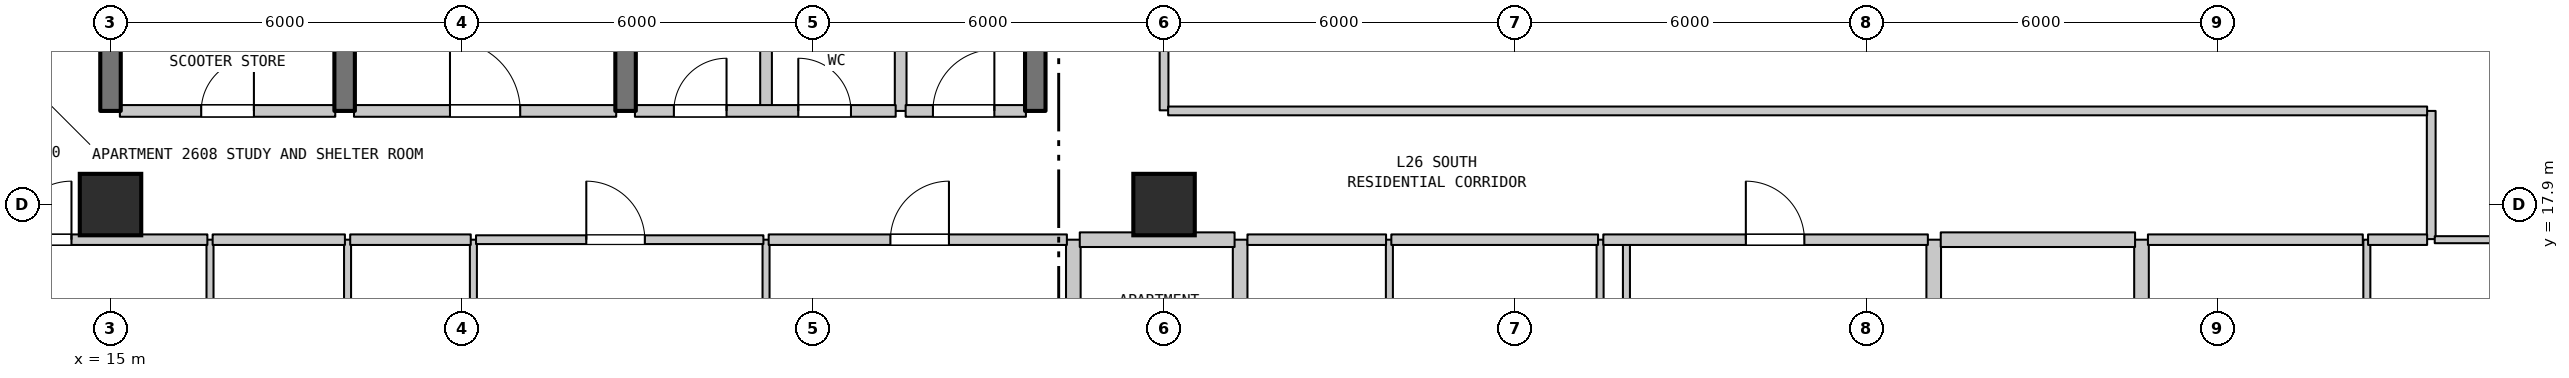
"""IFC4 building model, lengths in metres.
Left out: names, types, materials, properties, quantities, classifications, styles, units other than length and angle.
Written with IfcOpenShell. Run it as: python <this file> out.ifc"""

import sys

from ifc_helpers import new_model, si_unit, direction, frame, frame_2d, origin, origin_2d, place, context, subcontext, project, spatial, rectangle, extrude, element, fill, save


model = new_model("IFC4")
c1 = context("Model", 3, precision=1e-05, world=origin(), true_north=direction((0.0, 1.0)))
c2 = subcontext(c1, "Body", "Model", "MODEL_VIEW")
j1 = project(units=[si_unit("LENGTHUNIT", "METRE"), si_unit("PLANEANGLEUNIT", "RADIAN")], contexts=[c1])
p1 = place(None, origin())
s1 = spatial("IfcSite", under=j1, at=p1, CompositionType="ELEMENT")
p2 = place(p1, origin())
s2 = spatial("IfcBuilding", under=s1, at=p2, CompositionType="ELEMENT")
p3 = place(p2, frame((0.0, 0.0, 109.4)))
s3 = spatial("IfcBuildingStorey", under=s2, at=p3, CompositionType="ELEMENT", Elevation=109.4)
for number, where, z_axis, x_axis in (
    (1, (15.0, 17.9, 0.0), (0.0, 0.0, 1.0), (1.0, 0.0, 0.0)),
    (2, (33.0, 17.9, 0.0), (0.0, 0.0, 1.0), (1.0, 0.0, 0.0)),
):
    element("IfcColumn", number, at=place(p3, frame(where, z_axis=z_axis, x_axis=x_axis)), inside=s3, PredefinedType="COLUMN", context=c2, shape_type="SweptSolid", body=[
        extrude(rectangle(XDim=1.05, YDim=1.05, at=origin_2d()), origin(), (0.0, 0.0, 1.0), 3.7),
    ])
p4 = place(p3, frame((15.0, 19.5, 0.0), z_axis=(0.0, 0.0, 1.0), x_axis=(0.0, 1.0, 0.0)))
e3 = element("IfcWall", 3, at=p4, inside=s3, PredefinedType="SHEAR", context=c2, shape_type="SweptSolid", body=[
    extrude(rectangle(XDim=3.2, YDim=0.35, at=frame_2d((1.6, 0.0))), origin(), (0.0, 0.0, 1.0), 3.385),
])
p5 = place(p3, frame((16.7, 14.1, 0.0), z_axis=(0.0, 0.0, 1.0), x_axis=(0.0, 1.0, 0.0)))
e4 = element("IfcWall", 4, at=p5, inside=s3, PredefinedType="PARTITIONING", context=c2, shape_type="SweptSolid", body=[
    extrude(rectangle(XDim=3.2, YDim=0.12, at=frame_2d((1.6, 0.0))), origin(), (0.0, 0.0, 1.0), 3.385),
])
p6 = place(p5, frame((1.15, 0.0, 0.0)))
e5 = element("IfcOpeningElement", 5, at=p6, cuts=e4, PredefinedType="OPENING", context=c2, shape_type="SweptSolid", body=[
    extrude(rectangle(XDim=0.9, YDim=2.15, at=frame_2d((0.45, 1.075))), frame((0.0, 0.07, 0.0), z_axis=(0.0, -1.0, 0.0), x_axis=(1.0, 0.0, 0.0)), (0.0, 0.0, 1.0), 0.14),
])
p7 = place(p3, frame((19.0, 19.5, 0.0), z_axis=(0.0, 0.0, 1.0), x_axis=(0.0, 1.0, 0.0)))
e6 = element("IfcWall", 6, at=p7, inside=s3, PredefinedType="SHEAR", context=c2, shape_type="SweptSolid", body=[
    extrude(rectangle(XDim=3.2, YDim=0.35, at=frame_2d((1.6, 0.0))), origin(), (0.0, 0.0, 1.0), 3.385),
])
p8 = place(p3, frame((19.05, 14.1, 0.0), z_axis=(0.0, 0.0, 1.0), x_axis=(0.0, 1.0, 0.0)))
e7 = element("IfcWall", 7, at=p8, inside=s3, PredefinedType="PARTITIONING", context=c2, shape_type="SweptSolid", body=[
    extrude(rectangle(XDim=3.2, YDim=0.12, at=frame_2d((1.6, 0.0))), origin(), (0.0, 0.0, 1.0), 3.385),
])
p9 = place(p3, frame((21.2, 2.227, 0.0), z_axis=(0.0, 0.0, 1.0), x_axis=(0.0, 1.0, 0.0)))
e8 = element("IfcWall", 8, at=p9, inside=s3, PredefinedType="PARTITIONING", context=c2, shape_type="SweptSolid", body=[
    extrude(rectangle(XDim=15.073, YDim=0.12, at=frame_2d((7.537, 0.0))), origin(), (0.0, 0.0, 1.0), 3.385),
])
p10 = place(p3, frame((23.8, 19.5, 0.0), z_axis=(0.0, 0.0, 1.0), x_axis=(0.0, 1.0, 0.0)))
e9 = element("IfcWall", 9, at=p10, inside=s3, PredefinedType="SHEAR", context=c2, shape_type="SweptSolid", body=[
    extrude(rectangle(XDim=3.2, YDim=0.35, at=frame_2d((1.6, 0.0))), origin(), (0.0, 0.0, 1.0), 3.385),
])
p11 = place(p3, frame((26.2, 14.85, 0.0), z_axis=(0.0, 0.0, 1.0), x_axis=(0.0, 1.0, 0.0)))
e10 = element("IfcWall", 10, at=p11, inside=s3, PredefinedType="PARTITIONING", context=c2, shape_type="SweptSolid", body=[
    extrude(rectangle(XDim=2.45, YDim=0.12, at=frame_2d((1.225, 0.0))), origin(), (0.0, 0.0, 1.0), 3.385),
])
for number, where, z_axis, x_axis in (
    (11, (26.2, 19.5, 0.0), (0.0, 0.0, 1.0), (0.0, 1.0, 0.0)),
    (12, (28.5, 19.5, 0.0), (0.0, 0.0, 1.0), (0.0, 1.0, 0.0)),
):
    element("IfcWall", number, at=place(p3, frame(where, z_axis=z_axis, x_axis=x_axis)), inside=s3, PredefinedType="STANDARD", context=c2, shape_type="SweptSolid", body=[
        extrude(rectangle(XDim=3.2, YDim=0.2, at=frame_2d((1.6, 0.0))), origin(), (0.0, 0.0, 1.0), 3.385),
    ])
p12 = place(p3, frame((30.8, 19.5, 0.0), z_axis=(0.0, 0.0, 1.0), x_axis=(0.0, 1.0, 0.0)))
e13 = element("IfcWall", 13, at=p12, inside=s3, PredefinedType="SHEAR", context=c2, shape_type="SweptSolid", body=[
    extrude(rectangle(XDim=3.2, YDim=0.35, at=frame_2d((1.6, 0.0))), origin(), (0.0, 0.0, 1.0), 3.385),
])
p13 = place(p3, frame((31.45, 11.15, 0.0), z_axis=(0.0, 0.0, 1.0), x_axis=(0.0, 1.0, 0.0)))
e14 = element("IfcWall", 14, at=p13, inside=s3, PredefinedType="STANDARD", context=c2, shape_type="SweptSolid", body=[
    extrude(rectangle(XDim=6.15, YDim=0.25, at=frame_2d((3.075, 0.0))), origin(), (0.0, 0.0, 1.0), 3.385),
])
p14 = place(p13, frame((2.529, 0.0, 0.0)))
e15 = element("IfcOpeningElement", 15, at=p14, cuts=e14, PredefinedType="OPENING", context=c2, shape_type="SweptSolid", body=[
    extrude(rectangle(XDim=0.95, YDim=2.15, at=frame_2d((0.475, 1.075))), frame((0.0, 0.135, 0.0), z_axis=(0.0, -1.0, 0.0), x_axis=(1.0, 0.0, 0.0)), (0.0, 0.0, 1.0), 0.27),
])
p15 = place(p3, frame((33.0, 19.51, 0.0), z_axis=(0.0, 0.0, 1.0), x_axis=(0.0, 1.0, 0.0)))
e16 = element("IfcWall", 16, at=p15, inside=s3, PredefinedType="STANDARD", context=c2, shape_type="SweptSolid", body=[
    extrude(rectangle(XDim=6.18, YDim=0.15, at=frame_2d((3.09, 0.0))), origin(), (0.0, 0.0, 1.0), 2.935),
])
p16 = place(p3, frame((34.3, 11.15, 0.0), z_axis=(0.0, 0.0, 1.0), x_axis=(0.0, 1.0, 0.0)))
e17 = element("IfcWall", 17, at=p16, inside=s3, PredefinedType="STANDARD", context=c2, shape_type="SweptSolid", body=[
    extrude(rectangle(XDim=6.15, YDim=0.25, at=frame_2d((3.075, 0.0))), origin(), (0.0, 0.0, 1.0), 3.385),
])
for number, where, z_axis, x_axis in (
    (18, (36.85, 11.15, 0.0), (0.0, 0.0, 1.0), (0.0, 1.0, 0.0)),
    (19, (40.45, 11.15, 0.0), (0.0, 0.0, 1.0), (0.0, 1.0, 0.0)),
):
    element("IfcWall", number, at=place(p3, frame(where, z_axis=z_axis, x_axis=x_axis)), inside=s3, PredefinedType="PARTITIONING", context=c2, shape_type="SweptSolid", body=[
        extrude(rectangle(XDim=6.15, YDim=0.12, at=frame_2d((3.075, 0.0))), origin(), (0.0, 0.0, 1.0), 3.385),
    ])
p17 = place(p3, frame((40.9, 14.85, 0.0), z_axis=(0.0, 0.0, 1.0), x_axis=(0.0, 1.0, 0.0)))
e20 = element("IfcWall", 20, at=p17, inside=s3, PredefinedType="PARTITIONING", context=c2, shape_type="SweptSolid", body=[
    extrude(rectangle(XDim=2.45, YDim=0.12, at=frame_2d((1.225, 0.0))), origin(), (0.0, 0.0, 1.0), 3.385),
])
for number, where, z_axis, x_axis in (
    (21, (46.15, 11.15, 0.0), (0.0, 0.0, 1.0), (0.0, 1.0, 0.0)),
    (22, (49.7, 11.15, 0.0), (0.0, 0.0, 1.0), (0.0, 1.0, 0.0)),
):
    element("IfcWall", number, at=place(p3, frame(where, z_axis=z_axis, x_axis=x_axis)), inside=s3, PredefinedType="STANDARD", context=c2, shape_type="SweptSolid", body=[
        extrude(rectangle(XDim=6.15, YDim=0.25, at=frame_2d((3.075, 0.0))), origin(), (0.0, 0.0, 1.0), 3.385),
    ])
p18 = place(p3, frame((53.55, 11.15, 0.0), z_axis=(0.0, 0.0, 1.0), x_axis=(0.0, 1.0, 0.0)))
e23 = element("IfcWall", 23, at=p18, inside=s3, PredefinedType="PARTITIONING", context=c2, shape_type="SweptSolid", body=[
    extrude(rectangle(XDim=6.15, YDim=0.12, at=frame_2d((3.075, 0.0))), origin(), (0.0, 0.0, 1.0), 3.385),
])
p19 = place(p3, frame((54.65, 17.31, 0.0), z_axis=(0.0, 0.0, 1.0), x_axis=(0.0, 1.0, 0.0)))
e24 = element("IfcWall", 24, at=p19, inside=s3, PredefinedType="STANDARD", context=c2, shape_type="SweptSolid", body=[
    extrude(rectangle(XDim=2.19, YDim=0.15, at=frame_2d((1.095, 0.0))), origin(), (0.0, 0.0, 1.0), 3.385),
])
p20 = place(p3, frame((12.875, 17.3, 0.0), z_axis=(0.0, 0.0, 1.0), x_axis=(1.0, 0.0, 0.0)))
e25 = element("IfcWall", 25, at=p20, inside=s3, PredefinedType="STANDARD", context=c2, shape_type="SweptSolid", body=[
    extrude(rectangle(XDim=3.78, YDim=0.18, at=frame_2d((1.89, 0.0))), origin(), (0.0, 0.0, 1.0), 3.385),
])
p21 = place(p20, frame((0.458, 0.0, 0.0)))
e26 = element("IfcOpeningElement", 26, at=p21, cuts=e25, PredefinedType="OPENING", context=c2, shape_type="SweptSolid", body=[
    extrude(rectangle(XDim=1.0, YDim=2.15, at=frame_2d((0.5, 1.075))), frame((0.0, 0.1, 0.0), z_axis=(0.0, -1.0, 0.0), x_axis=(1.0, 0.0, 0.0)), (0.0, 0.0, 1.0), 0.2),
])
p22 = place(p3, frame((16.745, 17.3, 0.0), z_axis=(0.0, 0.0, 1.0), x_axis=(1.0, 0.0, 0.0)))
e27 = element("IfcWall", 27, at=p22, inside=s3, PredefinedType="STANDARD", context=c2, shape_type="SweptSolid", body=[
    extrude(rectangle(XDim=2.26, YDim=0.18, at=frame_2d((1.13, 0.0))), origin(), (0.0, 0.0, 1.0), 3.385),
])
p23 = place(p3, frame((19.095, 17.3, 0.0), z_axis=(0.0, 0.0, 1.0), x_axis=(1.0, 0.0, 0.0)))
e28 = element("IfcWall", 28, at=p23, inside=s3, PredefinedType="STANDARD", context=c2, shape_type="SweptSolid", body=[
    extrude(rectangle(XDim=2.06, YDim=0.18, at=frame_2d((1.03, 0.0))), origin(), (0.0, 0.0, 1.0), 3.385),
])
p24 = place(p3, frame((21.245, 17.3, 0.0), z_axis=(0.0, 0.0, 1.0), x_axis=(1.0, 0.0, 0.0)))
e29 = element("IfcWall", 29, at=p24, inside=s3, PredefinedType="STANDARD", context=c2, shape_type="SweptSolid", body=[
    extrude(rectangle(XDim=4.91, YDim=0.15, at=frame_2d((2.455, 0.0))), origin(), (0.0, 0.0, 1.0), 3.385),
])
p25 = place(p24, frame((1.884, 0.0, 0.0)))
e30 = element("IfcOpeningElement", 30, at=p25, cuts=e29, PredefinedType="OPENING", context=c2, shape_type="SweptSolid", body=[
    extrude(rectangle(XDim=1.0, YDim=2.15, at=frame_2d((0.5, 1.075))), frame((0.0, 0.085, 0.0), z_axis=(0.0, -1.0, 0.0), x_axis=(1.0, 0.0, 0.0)), (0.0, 0.0, 1.0), 0.17),
])
p26 = place(p3, frame((26.245, 17.3, 0.0), z_axis=(0.0, 0.0, 1.0), x_axis=(1.0, 0.0, 0.0)))
e31 = element("IfcWall", 31, at=p26, inside=s3, PredefinedType="STANDARD", context=c2, shape_type="SweptSolid", body=[
    extrude(rectangle(XDim=5.095, YDim=0.18, at=frame_2d((2.547, 0.0))), origin(), (0.0, 0.0, 1.0), 3.385),
])
p27 = place(p26, frame((2.08, 0.0, 0.0)))
e32 = element("IfcOpeningElement", 32, at=p27, cuts=e31, PredefinedType="OPENING", context=c2, shape_type="SweptSolid", body=[
    extrude(rectangle(XDim=1.0, YDim=2.15, at=frame_2d((0.5, 1.075))), frame((0.0, 0.1, 0.0), z_axis=(0.0, -1.0, 0.0), x_axis=(1.0, 0.0, 0.0)), (0.0, 0.0, 1.0), 0.2),
])
p28 = place(p3, frame((31.56, 17.3, 0.0), z_axis=(0.0, 0.0, 1.0), x_axis=(1.0, 0.0, 0.0)))
e33 = element("IfcWall", 33, at=p28, inside=s3, PredefinedType="STANDARD", context=c2, shape_type="SweptSolid", body=[
    extrude(rectangle(XDim=2.645, YDim=0.25, at=frame_2d((1.323, 0.0))), origin(), (0.0, 0.0, 1.0), 3.385),
])
p29 = place(p3, frame((34.425, 17.3, 0.0), z_axis=(0.0, 0.0, 1.0), x_axis=(1.0, 0.0, 0.0)))
e34 = element("IfcWall", 34, at=p29, inside=s3, PredefinedType="STANDARD", context=c2, shape_type="SweptSolid", body=[
    extrude(rectangle(XDim=2.368, YDim=0.18, at=frame_2d((1.184, 0.0))), origin(), (0.0, 0.0, 1.0), 3.385),
])
p30 = place(p3, frame((36.883, 17.3, 0.0), z_axis=(0.0, 0.0, 1.0), x_axis=(1.0, 0.0, 0.0)))
e35 = element("IfcWall", 35, at=p30, inside=s3, PredefinedType="STANDARD", context=c2, shape_type="SweptSolid", body=[
    extrude(rectangle(XDim=3.532, YDim=0.18, at=frame_2d((1.766, 0.0))), origin(), (0.0, 0.0, 1.0), 3.385),
])
p31 = place(p3, frame((40.505, 17.3, 0.0), z_axis=(0.0, 0.0, 1.0), x_axis=(1.0, 0.0, 0.0)))
e36 = element("IfcWall", 36, at=p31, inside=s3, PredefinedType="STANDARD", context=c2, shape_type="SweptSolid", body=[
    extrude(rectangle(XDim=5.545, YDim=0.18, at=frame_2d((2.772, 0.0))), origin(), (0.0, 0.0, 1.0), 3.385),
])
p32 = place(p31, frame((2.435, 0.0, 0.0)))
e37 = element("IfcOpeningElement", 37, at=p32, cuts=e36, PredefinedType="OPENING", context=c2, shape_type="SweptSolid", body=[
    extrude(rectangle(XDim=1.0, YDim=2.15, at=frame_2d((0.5, 1.075))), frame((0.0, 0.1, 0.0), z_axis=(0.0, -1.0, 0.0), x_axis=(1.0, 0.0, 0.0)), (0.0, 0.0, 1.0), 0.2),
])
p33 = place(p3, frame((46.27, 17.3, 0.0), z_axis=(0.0, 0.0, 1.0), x_axis=(1.0, 0.0, 0.0)))
e38 = element("IfcWall", 38, at=p33, inside=s3, PredefinedType="STANDARD", context=c2, shape_type="SweptSolid", body=[
    extrude(rectangle(XDim=3.32, YDim=0.25, at=frame_2d((1.66, 0.0))), origin(), (0.0, 0.0, 1.0), 3.385),
])
p34 = place(p3, frame((49.81, 17.3, 0.0), z_axis=(0.0, 0.0, 1.0), x_axis=(1.0, 0.0, 0.0)))
e39 = element("IfcWall", 39, at=p34, inside=s3, PredefinedType="STANDARD", context=c2, shape_type="SweptSolid", body=[
    extrude(rectangle(XDim=3.671, YDim=0.18, at=frame_2d((1.835, 0.0))), origin(), (0.0, 0.0, 1.0), 3.385),
])
p35 = place(p3, frame((53.571, 17.3, 0.0), z_axis=(0.0, 0.0, 1.0), x_axis=(1.0, 0.0, 0.0)))
e40 = element("IfcWall", 40, at=p35, inside=s3, PredefinedType="STANDARD", context=c2, shape_type="SweptSolid", body=[
    extrude(rectangle(XDim=1.009, YDim=0.18, at=frame_2d((0.504, 0.0))), origin(), (0.0, 0.0, 1.0), 3.385),
])
p36 = place(p3, frame((54.71, 17.3, 0.0), z_axis=(0.0, 0.0, 1.0), x_axis=(1.0, 0.0, 0.0)))
e41 = element("IfcWall", 41, at=p36, inside=s3, PredefinedType="PARTITIONING", context=c2, shape_type="SweptSolid", body=[
    extrude(rectangle(XDim=1.635, YDim=0.12, at=frame_2d((0.817, 0.0))), origin(), (0.0, 0.0, 1.0), 3.385),
])
p37 = place(p3, frame((15.16, 19.5, 0.0), z_axis=(0.0, 0.0, 1.0), x_axis=(1.0, 0.0, 0.0)))
e42 = element("IfcWall", 42, at=p37, inside=s3, PredefinedType="STANDARD", context=c2, shape_type="SweptSolid", body=[
    extrude(rectangle(XDim=3.68, YDim=0.2, at=frame_2d((1.84, 0.0))), origin(), (0.0, 0.0, 1.0), 3.385),
])
p38 = place(p37, frame((1.39, 0.0, 0.0)))
e43 = element("IfcOpeningElement", 43, at=p38, cuts=e42, PredefinedType="OPENING", context=c2, shape_type="SweptSolid", body=[
    extrude(rectangle(XDim=0.9, YDim=2.15, at=frame_2d((0.45, 1.075))), frame((0.0, 0.11, 0.0), z_axis=(0.0, -1.0, 0.0), x_axis=(1.0, 0.0, 0.0)), (0.0, 0.0, 1.0), 0.22),
])
p39 = place(p3, frame((19.16, 19.5, 0.0), z_axis=(0.0, 0.0, 1.0), x_axis=(1.0, 0.0, 0.0)))
e44 = element("IfcWall", 44, at=p39, inside=s3, PredefinedType="STANDARD", context=c2, shape_type="SweptSolid", body=[
    extrude(rectangle(XDim=4.48, YDim=0.2, at=frame_2d((2.24, 0.0))), origin(), (0.0, 0.0, 1.0), 3.385),
])
p40 = place(p39, frame((1.64, 0.0, 0.0)))
e45 = element("IfcOpeningElement", 45, at=p40, cuts=e44, PredefinedType="OPENING", context=c2, shape_type="SweptSolid", body=[
    extrude(rectangle(XDim=1.2, YDim=2.2, at=frame_2d((0.6, 1.1))), frame((0.0, 0.11, 0.0), z_axis=(0.0, -1.0, 0.0), x_axis=(1.0, 0.0, 0.0)), (0.0, 0.0, 1.0), 0.22),
])
p41 = place(p3, frame((23.96, 19.5, 0.0), z_axis=(0.0, 0.0, 1.0), x_axis=(1.0, 0.0, 0.0)))
e46 = element("IfcWall", 46, at=p41, inside=s3, PredefinedType="STANDARD", context=c2, shape_type="SweptSolid", body=[
    extrude(rectangle(XDim=4.455, YDim=0.2, at=frame_2d((2.228, 0.0))), origin(), (0.0, 0.0, 1.0), 3.385),
])
p42 = place(p41, frame((0.665, 0.0, 0.0)))
e47 = element("IfcOpeningElement", 47, at=p42, cuts=e46, PredefinedType="OPENING", context=c2, shape_type="SweptSolid", body=[
    extrude(rectangle(XDim=0.9, YDim=2.15, at=frame_2d((0.45, 1.075))), frame((0.0, 0.11, 0.0), z_axis=(0.0, -1.0, 0.0), x_axis=(1.0, 0.0, 0.0)), (0.0, 0.0, 1.0), 0.22),
])
p43 = place(p41, frame((2.791, 0.0, 0.0)))
e48 = element("IfcOpeningElement", 48, at=p43, cuts=e46, PredefinedType="OPENING", context=c2, shape_type="SweptSolid", body=[
    extrude(rectangle(XDim=0.9, YDim=2.15, at=frame_2d((0.45, 1.075))), frame((0.0, 0.11, 0.0), z_axis=(0.0, -1.0, 0.0), x_axis=(1.0, 0.0, 0.0)), (0.0, 0.0, 1.0), 0.22),
])
p44 = place(p3, frame((28.585, 19.5, 0.0), z_axis=(0.0, 0.0, 1.0), x_axis=(1.0, 0.0, 0.0)))
e49 = element("IfcWall", 49, at=p44, inside=s3, PredefinedType="STANDARD", context=c2, shape_type="SweptSolid", body=[
    extrude(rectangle(XDim=2.055, YDim=0.2, at=frame_2d((1.027, 0.0))), origin(), (0.0, 0.0, 1.0), 3.385),
])
p45 = place(p44, frame((0.466, 0.0, 0.0)))
e50 = element("IfcOpeningElement", 50, at=p45, cuts=e49, PredefinedType="OPENING", context=c2, shape_type="SweptSolid", body=[
    extrude(rectangle(XDim=1.05, YDim=2.15, at=frame_2d((0.525, 1.075))), frame((0.0, 0.11, 0.0), z_axis=(0.0, -1.0, 0.0), x_axis=(1.0, 0.0, 0.0)), (0.0, 0.0, 1.0), 0.22),
])
p46 = place(p3, frame((33.07, 19.5, 0.0), z_axis=(0.0, 0.0, 1.0), x_axis=(1.0, 0.0, 0.0)))
e51 = element("IfcWall", 51, at=p46, inside=s3, PredefinedType="STANDARD", context=c2, shape_type="SweptSolid", body=[
    extrude(rectangle(XDim=21.51, YDim=0.15, at=frame_2d((10.755, 0.0))), origin(), (0.0, 0.0, 1.0), 3.385),
])
p47 = place(p21, origin())
e52 = element("IfcDoor", 52, at=p47, inside=s3, OperationType="SINGLE_SWING_RIGHT", PredefinedType="DOOR", context=c2, shape_type="SweptSolid", body=[
    extrude(rectangle(XDim=1.0, YDim=2.15, at=frame_2d((0.5, 1.075))), frame((0.0, 0.025, 0.0), z_axis=(0.0, -1.0, 0.0), x_axis=(1.0, 0.0, 0.0)), (0.0, 0.0, 1.0), 0.05),
])
fill(e26, e52)
p48 = place(p25, origin())
e53 = element("IfcDoor", 53, at=p48, inside=s3, OperationType="SINGLE_SWING_LEFT", PredefinedType="DOOR", context=c2, shape_type="SweptSolid", body=[
    extrude(rectangle(XDim=1.0, YDim=2.15, at=frame_2d((0.5, 1.075))), frame((0.0, 0.025, 0.0), z_axis=(0.0, -1.0, 0.0), x_axis=(1.0, 0.0, 0.0)), (0.0, 0.0, 1.0), 0.05),
])
fill(e30, e53)
p49 = place(p27, origin())
e54 = element("IfcDoor", 54, at=p49, inside=s3, OperationType="SINGLE_SWING_RIGHT", PredefinedType="DOOR", context=c2, shape_type="SweptSolid", body=[
    extrude(rectangle(XDim=1.0, YDim=2.15, at=frame_2d((0.5, 1.075))), frame((0.0, 0.025, 0.0), z_axis=(0.0, -1.0, 0.0), x_axis=(1.0, 0.0, 0.0)), (0.0, 0.0, 1.0), 0.05),
])
fill(e32, e54)
p50 = place(p32, origin())
e55 = element("IfcDoor", 55, at=p50, inside=s3, OperationType="SINGLE_SWING_LEFT", PredefinedType="DOOR", context=c2, shape_type="SweptSolid", body=[
    extrude(rectangle(XDim=1.0, YDim=2.15, at=frame_2d((0.5, 1.075))), frame((0.0, 0.025, 0.0), z_axis=(0.0, -1.0, 0.0), x_axis=(1.0, 0.0, 0.0)), (0.0, 0.0, 1.0), 0.05),
])
fill(e37, e55)
p51 = place(p38, origin())
e56 = element("IfcDoor", 56, at=p51, inside=s3, OperationType="SINGLE_SWING_RIGHT", PredefinedType="DOOR", context=c2, shape_type="SweptSolid", body=[
    extrude(rectangle(XDim=0.9, YDim=2.15, at=frame_2d((0.45, 1.075))), frame((0.0, 0.025, 0.0), z_axis=(0.0, -1.0, 0.0), x_axis=(1.0, 0.0, 0.0)), (0.0, 0.0, 1.0), 0.05),
])
fill(e43, e56)
p52 = place(p40, origin())
e57 = element("IfcDoor", 57, at=p52, inside=s3, OperationType="SINGLE_SWING_LEFT", PredefinedType="DOOR", context=c2, shape_type="SweptSolid", body=[
    extrude(rectangle(XDim=1.2, YDim=2.2, at=frame_2d((0.6, 1.1))), frame((0.0, 0.025, 0.0), z_axis=(0.0, -1.0, 0.0), x_axis=(1.0, 0.0, 0.0)), (0.0, 0.0, 1.0), 0.05),
])
fill(e45, e57)
p53 = place(p42, origin())
e58 = element("IfcDoor", 58, at=p53, inside=s3, OperationType="SINGLE_SWING_RIGHT", PredefinedType="DOOR", context=c2, shape_type="SweptSolid", body=[
    extrude(rectangle(XDim=0.9, YDim=2.15, at=frame_2d((0.45, 1.075))), frame((0.0, 0.025, 0.0), z_axis=(0.0, -1.0, 0.0), x_axis=(1.0, 0.0, 0.0)), (0.0, 0.0, 1.0), 0.05),
])
fill(e47, e58)
p54 = place(p43, origin())
e59 = element("IfcDoor", 59, at=p54, inside=s3, OperationType="SINGLE_SWING_LEFT", PredefinedType="DOOR", context=c2, shape_type="SweptSolid", body=[
    extrude(rectangle(XDim=0.9, YDim=2.15, at=frame_2d((0.45, 1.075))), frame((0.0, 0.025, 0.0), z_axis=(0.0, -1.0, 0.0), x_axis=(1.0, 0.0, 0.0)), (0.0, 0.0, 1.0), 0.05),
])
fill(e48, e59)
p55 = place(p45, origin())
e60 = element("IfcDoor", 60, at=p55, inside=s3, OperationType="SINGLE_SWING_RIGHT", PredefinedType="DOOR", context=c2, shape_type="SweptSolid", body=[
    extrude(rectangle(XDim=1.05, YDim=2.15, at=frame_2d((0.525, 1.075))), frame((0.0, 0.025, 0.0), z_axis=(0.0, -1.0, 0.0), x_axis=(1.0, 0.0, 0.0)), (0.0, 0.0, 1.0), 0.05),
])
fill(e50, e60)
save(model, sys.argv[1])
